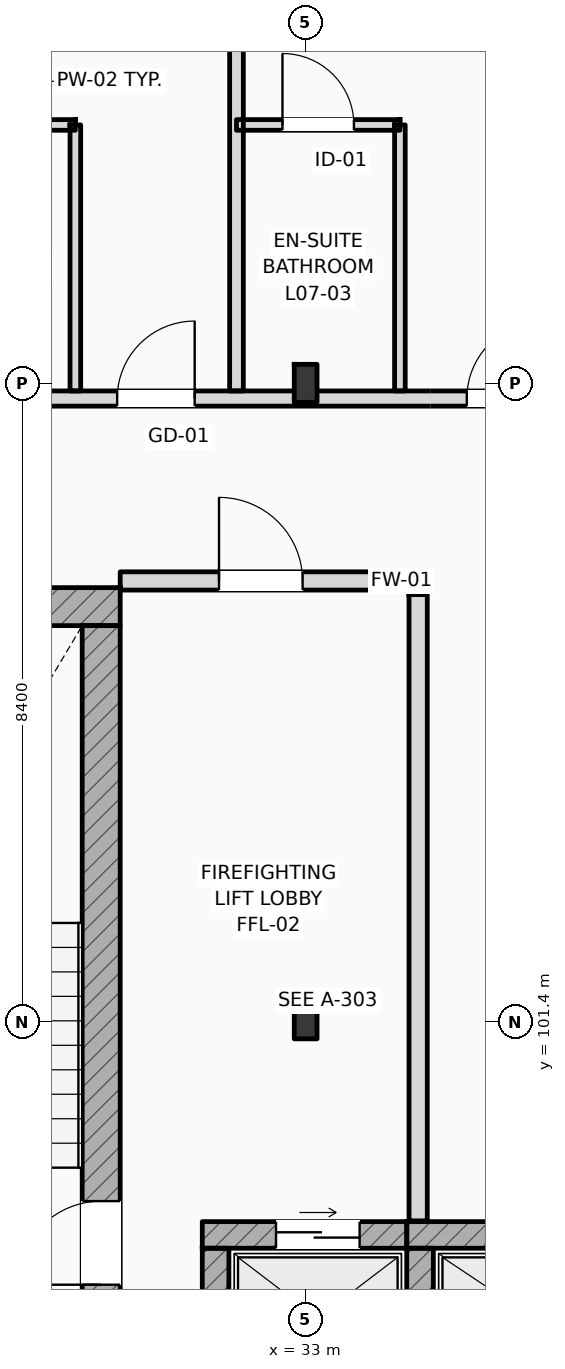
"""IFC4 building model, lengths in metres.
Left out: names, types, materials, properties, quantities, classifications, styles, units other than length and angle.
Written with IfcOpenShell. Run it as: python <this file> out.ifc"""

import sys

from ifc_helpers import new_model, si_unit, direction, frame, frame_2d, origin, origin_2d, place, context, subcontext, project, spatial, rectangle, i_section, extrude, element, fill, save


model = new_model("IFC4")
c1 = context("Model", 3, precision=1e-05, world=origin(), true_north=direction((0.0, 1.0)))
c2 = subcontext(c1, "Body", "Model", "MODEL_VIEW")
j1 = project(units=[si_unit("LENGTHUNIT", "METRE"), si_unit("PLANEANGLEUNIT", "RADIAN")], contexts=[c1])
p1 = place(None, origin())
s1 = spatial("IfcSite", under=j1, at=p1, CompositionType="ELEMENT")
p2 = place(p1, origin())
s2 = spatial("IfcBuilding", under=s1, at=p2, CompositionType="ELEMENT")
p3 = place(p2, frame((0.0, 0.0, 31.8)))
s3 = spatial("IfcBuildingStorey", under=s2, at=p3, CompositionType="ELEMENT", Elevation=31.8)
p4 = place(p3, frame((33.0, 101.4, 0.0), z_axis=(0.0, 0.0, 1.0), x_axis=(1.0, 0.0, 0.0)))
e1 = element("IfcColumn", 1, at=p4, inside=s3, PredefinedType="COLUMN", context=c2, shape_type="SweptSolid", body=[
    extrude(i_section(OverallWidth=0.3, OverallDepth=0.45, WebThickness=0.014, FlangeThickness=0.026, FilletRadius=0.027, at=origin_2d()), origin(), (0.0, 0.0, 1.0), 3.6),
])
p5 = place(p3, frame((33.0, 109.8, 0.0), z_axis=(0.0, 0.0, 1.0), x_axis=(1.0, 0.0, 0.0)))
e2 = element("IfcColumn", 2, at=p5, inside=s3, PredefinedType="COLUMN", context=c2, shape_type="SweptSolid", body=[
    extrude(i_section(OverallWidth=0.3, OverallDepth=0.5, WebThickness=0.014, FlangeThickness=0.028, FilletRadius=0.027, at=origin_2d()), origin(), (0.0, 0.0, 1.0), 3.6),
])
p6 = place(p3, frame((25.4, 106.862, 0.0), z_axis=(0.0, 0.0, 1.0), x_axis=(1.0, 0.0, 0.0)))
e3 = element("IfcWall", 3, at=p6, inside=s3, PredefinedType="SHEAR", context=c2, shape_type="SweptSolid", body=[
    extrude(rectangle(XDim=5.16, YDim=0.5, at=frame_2d((2.58, 0.0))), origin(), (0.0, 0.0, 1.0), 3.6),
])
p7 = place(p3, frame((30.31, 97.5, 0.0), z_axis=(0.0, 0.0, 1.0), x_axis=(0.0, 1.0, 0.0)))
e4 = element("IfcWall", 4, at=p7, inside=s3, PredefinedType="SHEAR", context=c2, shape_type="SweptSolid", body=[
    extrude(rectangle(XDim=9.112, YDim=0.5, at=frame_2d((4.556, 0.0))), origin(), (0.0, 0.0, 1.0), 3.6),
])
p8 = place(p7, frame((0.44, 0.0, 0.0)))
e5 = element("IfcOpeningElement", 5, at=p8, cuts=e4, PredefinedType="OPENING", context=c2, shape_type="SweptSolid", body=[
    extrude(rectangle(XDim=1.1, YDim=2.2, at=frame_2d((0.55, 1.1))), frame((0.0, 0.26, 0.0), z_axis=(0.0, -1.0, 0.0), x_axis=(1.0, 0.0, 0.0)), (0.0, 0.0, 1.0), 0.52),
])
p9 = place(p3, frame((31.64, 98.595, 0.0), z_axis=(0.0, 0.0, 1.0), x_axis=(1.0, 0.0, 0.0)))
e6 = element("IfcWall", 6, at=p9, inside=s3, PredefinedType="SHEAR", context=c2, shape_type="SweptSolid", body=[
    extrude(rectangle(XDim=2.69, YDim=0.35, at=frame_2d((1.345, 0.0))), origin(), (0.0, 0.0, 1.0), 3.36),
])
p10 = place(p9, frame((0.97, 0.0, 0.0)))
e7 = element("IfcOpeningElement", 7, at=p10, cuts=e6, PredefinedType="OPENING", context=c2, shape_type="SweptSolid", body=[
    extrude(rectangle(XDim=1.1, YDim=2.2, at=frame_2d((0.55, 1.1))), frame((0.0, 0.185, 0.0), z_axis=(0.0, -1.0, 0.0), x_axis=(1.0, 0.0, 0.0)), (0.0, 0.0, 1.0), 0.37),
])
p11 = place(p3, frame((31.815, 96.58, 0.0), z_axis=(0.0, 0.0, 1.0), x_axis=(0.0, 1.0, 0.0)))
e8 = element("IfcWall", 8, at=p11, inside=s3, PredefinedType="SHEAR", context=c2, shape_type="SweptSolid", body=[
    extrude(rectangle(XDim=1.84, YDim=0.35, at=frame_2d((0.92, 0.0))), origin(), (0.0, 0.0, 1.0), 3.36),
])
p12 = place(p3, frame((34.33, 98.595, 0.0), z_axis=(0.0, 0.0, 1.0), x_axis=(1.0, 0.0, 0.0)))
e9 = element("IfcWall", 9, at=p12, inside=s3, PredefinedType="SHEAR", context=c2, shape_type="SweptSolid", body=[
    extrude(rectangle(XDim=3.34, YDim=0.35, at=frame_2d((1.67, 0.0))), origin(), (0.0, 0.0, 1.0), 3.36),
])
p13 = place(p12, frame((1.045, 0.0, 0.0)))
e10 = element("IfcOpeningElement", 10, at=p13, cuts=e9, PredefinedType="OPENING", context=c2, shape_type="SweptSolid", body=[
    extrude(rectangle(XDim=1.25, YDim=2.25, at=frame_2d((0.625, 1.125))), frame((0.0, 0.185, 0.0), z_axis=(0.0, -1.0, 0.0), x_axis=(1.0, 0.0, 0.0)), (0.0, 0.0, 1.0), 0.37),
])
p14 = place(p3, frame((34.505, 96.58, 0.0), z_axis=(0.0, 0.0, 1.0), x_axis=(0.0, 1.0, 0.0)))
e11 = element("IfcWall", 11, at=p14, inside=s3, PredefinedType="SHEAR", context=c2, shape_type="SweptSolid", body=[
    extrude(rectangle(XDim=1.84, YDim=0.35, at=frame_2d((0.92, 0.0))), origin(), (0.0, 0.0, 1.0), 3.36),
])
p15 = place(p3, frame((34.48, 98.78, 0.0), z_axis=(0.0, 0.0, 1.0), x_axis=(0.0, 1.0, 0.0)))
e12 = element("IfcWall", 12, at=p15, inside=s3, PredefinedType="STANDARD", context=c2, shape_type="SweptSolid", body=[
    extrude(rectangle(XDim=8.24, YDim=0.24, at=frame_2d((4.12, 0.0))), origin(), (0.0, 0.0, 1.0), 3.36),
])
p16 = place(p3, frame((30.56, 107.2, 0.0), z_axis=(0.0, 0.0, 1.0), x_axis=(1.0, 0.0, 0.0)))
e13 = element("IfcWall", 13, at=p16, inside=s3, PredefinedType="STANDARD", context=c2, shape_type="SweptSolid", body=[
    extrude(rectangle(XDim=4.1, YDim=0.24, at=frame_2d((2.05, 0.0))), origin(), (0.0, 0.0, 1.0), 3.36),
])
p17 = place(p16, frame((1.3, 0.0, 0.0)))
e14 = element("IfcOpeningElement", 14, at=p17, cuts=e13, PredefinedType="OPENING", context=c2, shape_type="SweptSolid", body=[
    extrude(rectangle(XDim=1.1, YDim=2.2, at=frame_2d((0.55, 1.1))), frame((0.0, 0.13, 0.0), z_axis=(0.0, -1.0, 0.0), x_axis=(1.0, 0.0, 0.0)), (0.0, 0.0, 1.0), 0.26),
])
p18 = place(p3, frame((10.65, 109.6, 0.0), z_axis=(0.0, 0.0, 1.0), x_axis=(1.0, 0.0, 0.0)))
e15 = element("IfcWall", 15, at=p18, inside=s3, PredefinedType="PARTITIONING", context=c2, shape_type="SweptSolid", body=[
    extrude(rectangle(XDim=109.21, YDim=0.2, at=frame_2d((54.605, 0.0))), origin(), (0.0, 0.0, 1.0), 2.72),
])
p19 = place(p18, frame((15.825, 0.0, 0.0)))
e16 = element("IfcOpeningElement", 16, at=p19, cuts=e15, PredefinedType="OPENING", context=c2, shape_type="SweptSolid", body=[
    extrude(rectangle(XDim=1.02, YDim=2.2, at=frame_2d((0.51, 1.1))), frame((0.0, 0.11, 0.0), z_axis=(0.0, -1.0, 0.0), x_axis=(1.0, 0.0, 0.0)), (0.0, 0.0, 1.0), 0.22),
])
p20 = place(p18, frame((19.87, 0.0, 0.0)))
e17 = element("IfcOpeningElement", 17, at=p20, cuts=e15, PredefinedType="OPENING", context=c2, shape_type="SweptSolid", body=[
    extrude(rectangle(XDim=1.02, YDim=2.2, at=frame_2d((0.51, 1.1))), frame((0.0, 0.11, 0.0), z_axis=(0.0, -1.0, 0.0), x_axis=(1.0, 0.0, 0.0)), (0.0, 0.0, 1.0), 0.22),
])
p21 = place(p18, frame((24.47, 0.0, 0.0)))
e18 = element("IfcOpeningElement", 18, at=p21, cuts=e15, PredefinedType="OPENING", context=c2, shape_type="SweptSolid", body=[
    extrude(rectangle(XDim=1.02, YDim=2.2, at=frame_2d((0.51, 1.1))), frame((0.0, 0.11, 0.0), z_axis=(0.0, -1.0, 0.0), x_axis=(1.0, 0.0, 0.0)), (0.0, 0.0, 1.0), 0.22),
])
p22 = place(p18, frame((26.92, 0.0, 0.0)))
e19 = element("IfcOpeningElement", 19, at=p22, cuts=e15, PredefinedType="OPENING", context=c2, shape_type="SweptSolid", body=[
    extrude(rectangle(XDim=1.02, YDim=2.2, at=frame_2d((0.51, 1.1))), frame((0.0, 0.11, 0.0), z_axis=(0.0, -1.0, 0.0), x_axis=(1.0, 0.0, 0.0)), (0.0, 0.0, 1.0), 0.22),
])
p23 = place(p18, frame((33.7, 0.0, 0.0)))
e20 = element("IfcOpeningElement", 20, at=p23, cuts=e15, PredefinedType="OPENING", context=c2, shape_type="SweptSolid", body=[
    extrude(rectangle(XDim=0.96, YDim=2.2, at=frame_2d((0.48, 1.1))), frame((0.0, 0.11, 0.0), z_axis=(0.0, -1.0, 0.0), x_axis=(1.0, 0.0, 0.0)), (0.0, 0.0, 1.0), 0.22),
])
p24 = place(p18, frame((35.9, 0.0, 0.0)))
e21 = element("IfcOpeningElement", 21, at=p24, cuts=e15, PredefinedType="OPENING", context=c2, shape_type="SweptSolid", body=[
    extrude(rectangle(XDim=0.96, YDim=2.2, at=frame_2d((0.48, 1.1))), frame((0.0, 0.11, 0.0), z_axis=(0.0, -1.0, 0.0), x_axis=(1.0, 0.0, 0.0)), (0.0, 0.0, 1.0), 0.22),
])
p25 = place(p18, frame((42.9, 0.0, 0.0)))
e22 = element("IfcOpeningElement", 22, at=p25, cuts=e15, PredefinedType="OPENING", context=c2, shape_type="SweptSolid", body=[
    extrude(rectangle(XDim=0.96, YDim=2.2, at=frame_2d((0.48, 1.1))), frame((0.0, 0.11, 0.0), z_axis=(0.0, -1.0, 0.0), x_axis=(1.0, 0.0, 0.0)), (0.0, 0.0, 1.0), 0.22),
])
p26 = place(p18, frame((47.5, 0.0, 0.0)))
e23 = element("IfcOpeningElement", 23, at=p26, cuts=e15, PredefinedType="OPENING", context=c2, shape_type="SweptSolid", body=[
    extrude(rectangle(XDim=0.96, YDim=2.2, at=frame_2d((0.48, 1.1))), frame((0.0, 0.11, 0.0), z_axis=(0.0, -1.0, 0.0), x_axis=(1.0, 0.0, 0.0)), (0.0, 0.0, 1.0), 0.22),
])
p27 = place(p18, frame((49.95, 0.0, 0.0)))
e24 = element("IfcOpeningElement", 24, at=p27, cuts=e15, PredefinedType="OPENING", context=c2, shape_type="SweptSolid", body=[
    extrude(rectangle(XDim=0.96, YDim=2.2, at=frame_2d((0.48, 1.1))), frame((0.0, 0.11, 0.0), z_axis=(0.0, -1.0, 0.0), x_axis=(1.0, 0.0, 0.0)), (0.0, 0.0, 1.0), 0.22),
])
p28 = place(p18, frame((56.7, 0.0, 0.0)))
e25 = element("IfcOpeningElement", 25, at=p28, cuts=e15, PredefinedType="OPENING", context=c2, shape_type="SweptSolid", body=[
    extrude(rectangle(XDim=0.96, YDim=2.2, at=frame_2d((0.48, 1.1))), frame((0.0, 0.11, 0.0), z_axis=(0.0, -1.0, 0.0), x_axis=(1.0, 0.0, 0.0)), (0.0, 0.0, 1.0), 0.22),
])
p29 = place(p18, frame((59.15, 0.0, 0.0)))
e26 = element("IfcOpeningElement", 26, at=p29, cuts=e15, PredefinedType="OPENING", context=c2, shape_type="SweptSolid", body=[
    extrude(rectangle(XDim=0.96, YDim=2.2, at=frame_2d((0.48, 1.1))), frame((0.0, 0.11, 0.0), z_axis=(0.0, -1.0, 0.0), x_axis=(1.0, 0.0, 0.0)), (0.0, 0.0, 1.0), 0.22),
])
p30 = place(p18, frame((65.9, 0.0, 0.0)))
e27 = element("IfcOpeningElement", 27, at=p30, cuts=e15, PredefinedType="OPENING", context=c2, shape_type="SweptSolid", body=[
    extrude(rectangle(XDim=0.96, YDim=2.2, at=frame_2d((0.48, 1.1))), frame((0.0, 0.11, 0.0), z_axis=(0.0, -1.0, 0.0), x_axis=(1.0, 0.0, 0.0)), (0.0, 0.0, 1.0), 0.22),
])
p31 = place(p18, frame((70.5, 0.0, 0.0)))
e28 = element("IfcOpeningElement", 28, at=p31, cuts=e15, PredefinedType="OPENING", context=c2, shape_type="SweptSolid", body=[
    extrude(rectangle(XDim=0.96, YDim=2.2, at=frame_2d((0.48, 1.1))), frame((0.0, 0.11, 0.0), z_axis=(0.0, -1.0, 0.0), x_axis=(1.0, 0.0, 0.0)), (0.0, 0.0, 1.0), 0.22),
])
p32 = place(p18, frame((72.95, 0.0, 0.0)))
e29 = element("IfcOpeningElement", 29, at=p32, cuts=e15, PredefinedType="OPENING", context=c2, shape_type="SweptSolid", body=[
    extrude(rectangle(XDim=0.96, YDim=2.2, at=frame_2d((0.48, 1.1))), frame((0.0, 0.11, 0.0), z_axis=(0.0, -1.0, 0.0), x_axis=(1.0, 0.0, 0.0)), (0.0, 0.0, 1.0), 0.22),
])
p33 = place(p18, frame((79.7, 0.0, 0.0)))
e30 = element("IfcOpeningElement", 30, at=p33, cuts=e15, PredefinedType="OPENING", context=c2, shape_type="SweptSolid", body=[
    extrude(rectangle(XDim=0.96, YDim=2.2, at=frame_2d((0.48, 1.1))), frame((0.0, 0.11, 0.0), z_axis=(0.0, -1.0, 0.0), x_axis=(1.0, 0.0, 0.0)), (0.0, 0.0, 1.0), 0.22),
])
p34 = place(p18, frame((82.15, 0.0, 0.0)))
e31 = element("IfcOpeningElement", 31, at=p34, cuts=e15, PredefinedType="OPENING", context=c2, shape_type="SweptSolid", body=[
    extrude(rectangle(XDim=0.96, YDim=2.2, at=frame_2d((0.48, 1.1))), frame((0.0, 0.11, 0.0), z_axis=(0.0, -1.0, 0.0), x_axis=(1.0, 0.0, 0.0)), (0.0, 0.0, 1.0), 0.22),
])
p35 = place(p18, frame((88.9, 0.0, 0.0)))
e32 = element("IfcOpeningElement", 32, at=p35, cuts=e15, PredefinedType="OPENING", context=c2, shape_type="SweptSolid", body=[
    extrude(rectangle(XDim=0.96, YDim=2.2, at=frame_2d((0.48, 1.1))), frame((0.0, 0.11, 0.0), z_axis=(0.0, -1.0, 0.0), x_axis=(1.0, 0.0, 0.0)), (0.0, 0.0, 1.0), 0.22),
])
p36 = place(p18, frame((93.75, 0.0, 0.0)))
e33 = element("IfcOpeningElement", 33, at=p36, cuts=e15, PredefinedType="OPENING", context=c2, shape_type="SweptSolid", body=[
    extrude(rectangle(XDim=0.96, YDim=2.2, at=frame_2d((0.48, 1.1))), frame((0.0, 0.11, 0.0), z_axis=(0.0, -1.0, 0.0), x_axis=(1.0, 0.0, 0.0)), (0.0, 0.0, 1.0), 0.22),
])
p37 = place(p18, frame((98.1, 0.0, 0.0)))
e34 = element("IfcOpeningElement", 34, at=p37, cuts=e15, PredefinedType="OPENING", context=c2, shape_type="SweptSolid", body=[
    extrude(rectangle(XDim=0.96, YDim=2.2, at=frame_2d((0.48, 1.1))), frame((0.0, 0.11, 0.0), z_axis=(0.0, -1.0, 0.0), x_axis=(1.0, 0.0, 0.0)), (0.0, 0.0, 1.0), 0.22),
])
p38 = place(p18, frame((102.7, 0.0, 0.0)))
e35 = element("IfcOpeningElement", 35, at=p38, cuts=e15, PredefinedType="OPENING", context=c2, shape_type="SweptSolid", body=[
    extrude(rectangle(XDim=0.96, YDim=2.2, at=frame_2d((0.48, 1.1))), frame((0.0, 0.11, 0.0), z_axis=(0.0, -1.0, 0.0), x_axis=(1.0, 0.0, 0.0)), (0.0, 0.0, 1.0), 0.22),
])
p39 = place(p18, frame((105.04, 0.0, 0.0)))
e36 = element("IfcOpeningElement", 36, at=p39, cuts=e15, PredefinedType="OPENING", context=c2, shape_type="SweptSolid", body=[
    extrude(rectangle(XDim=0.96, YDim=2.2, at=frame_2d((0.48, 1.1))), frame((0.0, 0.11, 0.0), z_axis=(0.0, -1.0, 0.0), x_axis=(1.0, 0.0, 0.0)), (0.0, 0.0, 1.0), 0.22),
])
p40 = place(p18, frame((2.716, 0.0, 0.0)))
e37 = element("IfcOpeningElement", 37, at=p40, cuts=e15, PredefinedType="OPENING", context=c2, shape_type="SweptSolid", body=[
    extrude(rectangle(XDim=1.35, YDim=2.25, at=frame_2d((0.675, 1.125))), frame((0.0, 0.11, 0.0), z_axis=(0.0, -1.0, 0.0), x_axis=(1.0, 0.0, 0.0)), (0.0, 0.0, 1.0), 0.22),
])
p41 = place(p18, frame((6.65, 0.0, 0.0)))
e38 = element("IfcOpeningElement", 38, at=p41, cuts=e15, PredefinedType="OPENING", context=c2, shape_type="SweptSolid", body=[
    extrude(rectangle(XDim=1.35, YDim=2.25, at=frame_2d((0.675, 1.125))), frame((0.0, 0.11, 0.0), z_axis=(0.0, -1.0, 0.0), x_axis=(1.0, 0.0, 0.0)), (0.0, 0.0, 1.0), 0.22),
])
p42 = place(p18, frame((10.583, 0.0, 0.0)))
e39 = element("IfcOpeningElement", 39, at=p42, cuts=e15, PredefinedType="OPENING", context=c2, shape_type="SweptSolid", body=[
    extrude(rectangle(XDim=1.35, YDim=2.25, at=frame_2d((0.675, 1.125))), frame((0.0, 0.11, 0.0), z_axis=(0.0, -1.0, 0.0), x_axis=(1.0, 0.0, 0.0)), (0.0, 0.0, 1.0), 0.22),
])
p43 = place(p3, frame((32.09, 109.7, 0.0), z_axis=(0.0, 0.0, 1.0), x_axis=(0.0, 1.0, 0.0)))
e40 = element("IfcWall", 40, at=p43, inside=s3, PredefinedType="PARTITIONING", context=c2, shape_type="SweptSolid", body=[
    extrude(rectangle(XDim=8.15, YDim=0.18, at=frame_2d((4.075, 0.0))), origin(), (0.0, 0.0, 1.0), 3.36),
])
p44 = place(p3, frame((29.97, 109.7, 0.0), z_axis=(0.0, 0.0, 1.0), x_axis=(0.0, 1.0, 0.0)))
e41 = element("IfcWall", 41, at=p44, inside=s3, PredefinedType="PARTITIONING", context=c2, shape_type="SweptSolid", body=[
    extrude(rectangle(XDim=3.5, YDim=0.14, at=frame_2d((1.75, 0.0))), origin(), (0.0, 0.0, 1.0), 3.36),
])
p45 = place(p3, frame((27.82, 113.2, 0.0), z_axis=(0.0, 0.0, 1.0), x_axis=(1.0, 0.0, 0.0)))
e42 = element("IfcWall", 42, at=p45, inside=s3, PredefinedType="PARTITIONING", context=c2, shape_type="SweptSolid", body=[
    extrude(rectangle(XDim=2.15, YDim=0.14, at=frame_2d((1.075, 0.0))), origin(), (0.0, 0.0, 1.0), 3.36),
])
p46 = place(p45, frame((0.605, 0.0, 0.0)))
e43 = element("IfcOpeningElement", 43, at=p46, cuts=e42, PredefinedType="OPENING", context=c2, shape_type="SweptSolid", body=[
    extrude(rectangle(XDim=0.94, YDim=2.15, at=frame_2d((0.47, 1.075))), frame((0.0, 0.08, 0.0), z_axis=(0.0, -1.0, 0.0), x_axis=(1.0, 0.0, 0.0)), (0.0, 0.0, 1.0), 0.16),
])
p47 = place(p3, frame((34.24, 109.7, 0.0), z_axis=(0.0, 0.0, 1.0), x_axis=(0.0, 1.0, 0.0)))
e44 = element("IfcWall", 44, at=p47, inside=s3, PredefinedType="PARTITIONING", context=c2, shape_type="SweptSolid", body=[
    extrude(rectangle(XDim=3.5, YDim=0.14, at=frame_2d((1.75, 0.0))), origin(), (0.0, 0.0, 1.0), 3.36),
])
p48 = place(p3, frame((32.09, 113.2, 0.0), z_axis=(0.0, 0.0, 1.0), x_axis=(1.0, 0.0, 0.0)))
e45 = element("IfcWall", 45, at=p48, inside=s3, PredefinedType="PARTITIONING", context=c2, shape_type="SweptSolid", body=[
    extrude(rectangle(XDim=2.15, YDim=0.14, at=frame_2d((1.075, 0.0))), origin(), (0.0, 0.0, 1.0), 3.36),
])
p49 = place(p48, frame((0.605, 0.0, 0.0)))
e46 = element("IfcOpeningElement", 46, at=p49, cuts=e45, PredefinedType="OPENING", context=c2, shape_type="SweptSolid", body=[
    extrude(rectangle(XDim=0.94, YDim=2.15, at=frame_2d((0.47, 1.075))), frame((0.0, 0.08, 0.0), z_axis=(0.0, -1.0, 0.0), x_axis=(1.0, 0.0, 0.0)), (0.0, 0.0, 1.0), 0.16),
])
p50 = place(p8, origin())
e47 = element("IfcDoor", 47, at=p50, inside=s3, OperationType="SINGLE_SWING_LEFT", PredefinedType="DOOR", context=c2, shape_type="SweptSolid", body=[
    extrude(rectangle(XDim=1.1, YDim=2.2, at=frame_2d((0.55, 1.1))), frame((0.0, 0.025, 0.0), z_axis=(0.0, -1.0, 0.0), x_axis=(1.0, 0.0, 0.0)), (0.0, 0.0, 1.0), 0.05),
])
fill(e5, e47)
p51 = place(p10, origin())
e48 = element("IfcDoor", 48, at=p51, inside=s3, OperationType="SLIDING_TO_LEFT", PredefinedType="DOOR", context=c2, shape_type="SweptSolid", body=[
    extrude(rectangle(XDim=1.1, YDim=2.2, at=frame_2d((0.55, 1.1))), frame((0.0, 0.025, 0.0), z_axis=(0.0, -1.0, 0.0), x_axis=(1.0, 0.0, 0.0)), (0.0, 0.0, 1.0), 0.05),
])
fill(e7, e48)
p52 = place(p17, origin())
e49 = element("IfcDoor", 49, at=p52, inside=s3, OperationType="SINGLE_SWING_LEFT", PredefinedType="DOOR", context=c2, shape_type="SweptSolid", body=[
    extrude(rectangle(XDim=1.1, YDim=2.2, at=frame_2d((0.55, 1.1))), frame((0.0, 0.025, 0.0), z_axis=(0.0, -1.0, 0.0), x_axis=(1.0, 0.0, 0.0)), (0.0, 0.0, 1.0), 0.05),
])
fill(e14, e49)
p53 = place(p20, origin())
e50 = element("IfcDoor", 50, at=p53, inside=s3, OperationType="SINGLE_SWING_RIGHT", PredefinedType="DOOR", context=c2, shape_type="SweptSolid", body=[
    extrude(rectangle(XDim=1.02, YDim=2.2, at=frame_2d((0.51, 1.1))), frame((0.0, 0.025, 0.0), z_axis=(0.0, -1.0, 0.0), x_axis=(1.0, 0.0, 0.0)), (0.0, 0.0, 1.0), 0.05),
])
fill(e17, e50)
p54 = place(p21, origin())
e51 = element("IfcDoor", 51, at=p54, inside=s3, OperationType="SINGLE_SWING_RIGHT", PredefinedType="DOOR", context=c2, shape_type="SweptSolid", body=[
    extrude(rectangle(XDim=1.02, YDim=2.2, at=frame_2d((0.51, 1.1))), frame((0.0, 0.025, 0.0), z_axis=(0.0, -1.0, 0.0), x_axis=(1.0, 0.0, 0.0)), (0.0, 0.0, 1.0), 0.05),
])
fill(e18, e51)
p55 = place(p49, origin())
e52 = element("IfcDoor", 52, at=p55, inside=s3, OperationType="SINGLE_SWING_LEFT", PredefinedType="DOOR", context=c2, shape_type="SweptSolid", body=[
    extrude(rectangle(XDim=0.94, YDim=2.15, at=frame_2d((0.47, 1.075))), frame((0.0, 0.025, 0.0), z_axis=(0.0, -1.0, 0.0), x_axis=(1.0, 0.0, 0.0)), (0.0, 0.0, 1.0), 0.05),
])
fill(e46, e52)
save(model, sys.argv[1])
